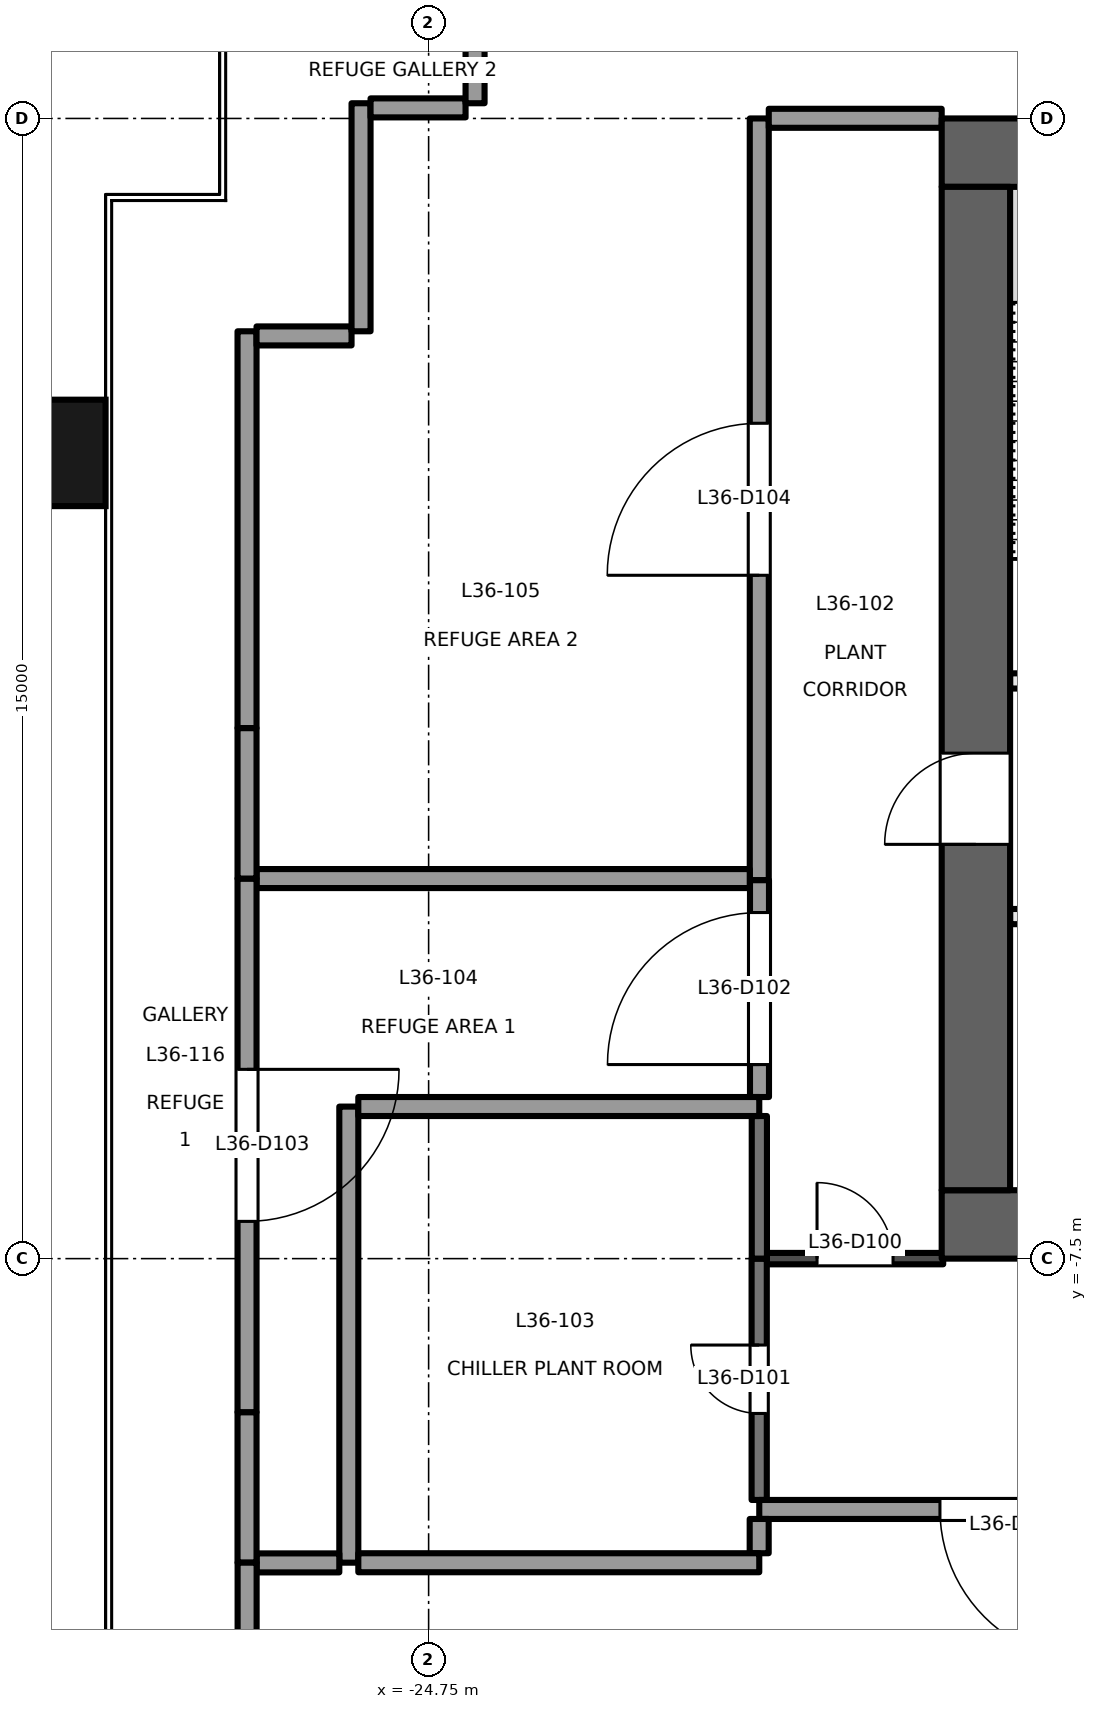
"""IFC4 building model, lengths in metres.
Left out: names, types, materials, properties, quantities, classifications, styles, units other than length and angle.
Written with IfcOpenShell. Run it as: python <this file> out.ifc"""

import sys

from ifc_helpers import new_model, si_unit, direction, frame, frame_2d, origin, origin_2d, place, context, subcontext, project, spatial, rectangle, extrude, element, fill, save


model = new_model("IFC4")
c1 = context("Model", 3, precision=1e-05, world=origin(), true_north=direction((0.0, 1.0)))
c2 = subcontext(c1, "Body", "Model", "MODEL_VIEW")
j1 = project(units=[si_unit("LENGTHUNIT", "METRE"), si_unit("PLANEANGLEUNIT", "RADIAN")], contexts=[c1])
p1 = place(None, origin())
s1 = spatial("IfcSite", under=j1, at=p1, CompositionType="ELEMENT")
p2 = place(p1, origin())
s2 = spatial("IfcBuilding", under=s1, at=p2, CompositionType="ELEMENT")
p3 = place(p2, frame((0.0, 0.0, 158.1)))
s3 = spatial("IfcBuildingStorey", under=s2, at=p3, CompositionType="ELEMENT", Elevation=158.1)
p4 = place(p3, frame((-29.9, 3.1, -0.2), z_axis=(0.0, 0.0, 1.0), x_axis=(0.0, 1.0, 0.0)))
e1 = element("IfcColumn", 1, at=p4, inside=s3, PredefinedType="COLUMN", context=c2, shape_type="SweptSolid", body=[
    extrude(rectangle(XDim=1.4, YDim=1.8, at=origin_2d()), origin(), (0.0, 0.0, 1.0), 5.0),
])
p5 = place(p3, frame((-18.0, -7.05, -0.2), z_axis=(0.0, 0.0, 1.0), x_axis=(1.0, 0.0, 0.0)))
e2 = element("IfcWall", 2, at=p5, inside=s3, PredefinedType="SHEAR", context=c2, shape_type="SweptSolid", body=[
    extrude(rectangle(XDim=36.0, YDim=0.9, at=frame_2d((18.0, 0.0))), origin(), (0.0, 0.0, 1.0), 5.0),
])
p6 = place(p5, frame((7.8, 0.0, 0.2)))
e3 = element("IfcOpeningElement", 3, at=p6, cuts=e2, PredefinedType="OPENING", context=c2, shape_type="SweptSolid", body=[
    extrude(rectangle(XDim=2.4, YDim=2.1, at=frame_2d((1.2, 1.05))), frame((0.0, 0.46, 0.0), z_axis=(0.0, -1.0, 0.0), x_axis=(1.0, 0.0, 0.0)), (0.0, 0.0, 1.0), 0.921),
])
p7 = place(p5, frame((17.4, 0.0, 0.2)))
e4 = element("IfcOpeningElement", 4, at=p7, cuts=e2, PredefinedType="OPENING", context=c2, shape_type="SweptSolid", body=[
    extrude(rectangle(XDim=1.2, YDim=2.1, at=frame_2d((0.6, 1.05))), frame((0.0, 0.46, 0.0), z_axis=(0.0, -1.0, 0.0), x_axis=(1.0, 0.0, 0.0)), (0.0, 0.0, 1.0), 0.921),
])
p8 = place(p5, frame((26.1, 0.0, 0.2)))
e5 = element("IfcOpeningElement", 5, at=p8, cuts=e2, PredefinedType="OPENING", context=c2, shape_type="SweptSolid", body=[
    extrude(rectangle(XDim=2.4, YDim=2.1, at=frame_2d((1.2, 1.05))), frame((0.0, 0.46, 0.0), z_axis=(0.0, -1.0, 0.0), x_axis=(1.0, 0.0, 0.0)), (0.0, 0.0, 1.0), 0.921),
])
p9 = place(p3, frame((-18.0, 7.05, -0.2), z_axis=(0.0, 0.0, 1.0), x_axis=(1.0, 0.0, 0.0)))
e6 = element("IfcWall", 6, at=p9, inside=s3, PredefinedType="SHEAR", context=c2, shape_type="SweptSolid", body=[
    extrude(rectangle(XDim=36.0, YDim=0.9, at=frame_2d((18.0, 0.0))), origin(), (0.0, 0.0, 1.0), 5.0),
])
p10 = place(p3, frame((-17.55, -6.6, -0.2), z_axis=(0.0, 0.0, 1.0), x_axis=(0.0, 1.0, 0.0)))
e7 = element("IfcWall", 7, at=p10, inside=s3, PredefinedType="SHEAR", context=c2, shape_type="SweptSolid", body=[
    extrude(rectangle(XDim=13.2, YDim=0.9, at=frame_2d((6.6, 0.0))), origin(), (0.0, 0.0, 1.0), 5.0),
])
p11 = place(p10, frame((4.55, 0.0, 0.2)))
e8 = element("IfcOpeningElement", 8, at=p11, cuts=e7, PredefinedType="OPENING", context=c2, shape_type="SweptSolid", body=[
    extrude(rectangle(XDim=1.2, YDim=2.1, at=frame_2d((0.6, 1.05))), frame((0.0, 0.46, 0.0), z_axis=(0.0, -1.0, 0.0), x_axis=(1.0, 0.0, 0.0)), (0.0, 0.0, 1.0), 0.921),
])
p12 = place(p3, frame((-17.1, -3.0, 0.0), z_axis=(0.0, 0.0, 1.0), x_axis=(1.0, 0.0, 0.0)))
e9 = element("IfcWall", 9, at=p12, inside=s3, PredefinedType="PARTITIONING", context=c2, shape_type="SweptSolid", body=[
    extrude(rectangle(XDim=3.3, YDim=0.2, at=frame_2d((1.65, 0.0))), origin(), (0.0, 0.0, 1.0), 4.8),
])
p13 = place(p12, frame((1.1, 0.0, 0.0)))
e10 = element("IfcOpeningElement", 10, at=p13, cuts=e9, PredefinedType="OPENING", context=c2, shape_type="SweptSolid", body=[
    extrude(rectangle(XDim=1.1, YDim=2.1, at=frame_2d((0.55, 1.05))), frame((0.0, 0.111, 0.0), z_axis=(0.0, -1.0, 0.0), x_axis=(1.0, 0.0, 0.0)), (0.0, 0.0, 1.0), 0.221),
])
p14 = place(p3, frame((-17.1, 0.1, 0.0), z_axis=(0.0, 0.0, 1.0), x_axis=(1.0, 0.0, 0.0)))
e11 = element("IfcWall", 11, at=p14, inside=s3, PredefinedType="PARTITIONING", context=c2, shape_type="SweptSolid", body=[
    extrude(rectangle(XDim=3.3, YDim=0.2, at=frame_2d((1.65, 0.0))), origin(), (0.0, 0.0, 1.0), 4.8),
])
p15 = place(p14, frame((1.1, 0.0, 0.0)))
e12 = element("IfcOpeningElement", 12, at=p15, cuts=e11, PredefinedType="OPENING", context=c2, shape_type="SweptSolid", body=[
    extrude(rectangle(XDim=1.1, YDim=2.1, at=frame_2d((0.55, 1.05))), frame((0.0, 0.111, 0.0), z_axis=(0.0, -1.0, 0.0), x_axis=(1.0, 0.0, 0.0)), (0.0, 0.0, 1.0), 0.221),
])
p16 = place(p3, frame((-20.3, -7.5, 0.0), z_axis=(0.0, 0.0, 1.0), x_axis=(1.0, 0.0, 0.0)))
e13 = element("IfcWall", 13, at=p16, inside=s3, PredefinedType="PARTITIONING", context=c2, shape_type="SweptSolid", body=[
    extrude(rectangle(XDim=2.32, YDim=0.15, at=frame_2d((1.16, 0.0))), origin(), (0.0, 0.0, 1.0), 4.8),
])
p17 = place(p16, frame((0.66, 0.0, 0.0)))
e14 = element("IfcOpeningElement", 14, at=p17, cuts=e13, PredefinedType="OPENING", context=c2, shape_type="SweptSolid", body=[
    extrude(rectangle(XDim=1.0, YDim=2.1, at=frame_2d((0.5, 1.05))), frame((0.0, 0.085, 0.0), z_axis=(0.0, -1.0, 0.0), x_axis=(1.0, 0.0, 0.0)), (0.0, 0.0, 1.0), 0.171),
])
p18 = place(p3, frame((-20.401, -10.675, 0.0), z_axis=(0.0, 0.0, 1.0), x_axis=(0.0, 1.0, 0.0)))
e15 = element("IfcWall", 15, at=p18, inside=s3, PredefinedType="PARTITIONING", context=c2, shape_type="SweptSolid", body=[
    extrude(rectangle(XDim=3.175, YDim=0.2, at=frame_2d((1.587, 0.0))), origin(), (0.0, 0.0, 1.0), 4.8),
])
p19 = place(p18, frame((1.138, 0.0, 0.0)))
e16 = element("IfcOpeningElement", 16, at=p19, cuts=e15, PredefinedType="OPENING", context=c2, shape_type="SweptSolid", body=[
    extrude(rectangle(XDim=0.9, YDim=2.1, at=frame_2d((0.45, 1.05))), frame((0.0, 0.111, 0.0), z_axis=(0.0, -1.0, 0.0), x_axis=(1.0, 0.0, 0.0)), (0.0, 0.0, 1.0), 0.221),
])
p20 = place(p3, frame((-13.647, -10.8, 0.0), z_axis=(0.0, 0.0, 1.0), x_axis=(-1.0, 0.0, 0.0)))
e17 = element("IfcWall", 17, at=p20, inside=s3, PredefinedType="PARTITIONING", context=c2, shape_type="SweptSolid", body=[
    extrude(rectangle(XDim=6.753, YDim=0.25, at=frame_2d((3.376, 0.0))), origin(), (0.0, 0.0, 1.0), 3.9),
])
p21 = place(p20, frame((2.376, 0.0, 0.0)))
e18 = element("IfcOpeningElement", 18, at=p21, cuts=e17, PredefinedType="OPENING", context=c2, shape_type="SweptSolid", body=[
    extrude(rectangle(XDim=2.0, YDim=2.1, at=frame_2d((1.0, 1.05))), frame((0.0, 0.135, 0.0), z_axis=(0.0, -1.0, 0.0), x_axis=(1.0, 0.0, 0.0)), (0.0, 0.0, 1.0), 0.271),
])
p22 = place(p3, frame((-20.399, -7.5, 0.0), z_axis=(0.0, 0.0, 1.0), x_axis=(0.0, 1.0, 0.0)))
e19 = element("IfcWall", 19, at=p22, inside=s3, PredefinedType="PARTITIONING", context=c2, shape_type="SweptSolid", body=[
    extrude(rectangle(XDim=1.876, YDim=0.2, at=frame_2d((0.938, 0.0))), origin(), (0.0, 0.0, 1.0), 4.8),
])
p23 = place(p3, frame((-20.397, -5.374, 0.0), z_axis=(0.0, 0.0, 1.0), x_axis=(0.0, 1.0, 0.0)))
e20 = element("IfcWall", 20, at=p23, inside=s3, PredefinedType="PARTITIONING", context=c2, shape_type="SweptSolid", body=[
    extrude(rectangle(XDim=2.854, YDim=0.25, at=frame_2d((1.427, 0.0))), origin(), (0.0, 0.0, 1.0), 4.35),
])
p24 = place(p23, frame((0.427, 0.0, 0.0)))
e21 = element("IfcOpeningElement", 21, at=p24, cuts=e20, PredefinedType="OPENING", context=c2, shape_type="SweptSolid", body=[
    extrude(rectangle(XDim=2.0, YDim=2.1, at=frame_2d((1.0, 1.05))), frame((0.0, 0.135, 0.0), z_axis=(0.0, -1.0, 0.0), x_axis=(1.0, 0.0, 0.0)), (0.0, 0.0, 1.0), 0.271),
])
p25 = place(p3, frame((-20.4, -2.52, 0.0), z_axis=(0.0, 0.0, 1.0), x_axis=(0.0, 1.0, 0.0)))
e22 = element("IfcWall", 22, at=p25, inside=s3, PredefinedType="PARTITIONING", context=c2, shape_type="SweptSolid", body=[
    extrude(rectangle(XDim=10.02, YDim=0.25, at=frame_2d((5.01, 0.0))), origin(), (0.0, 0.0, 1.0), 4.3),
])
p26 = place(p25, frame((4.01, 0.0, 0.0)))
e23 = element("IfcOpeningElement", 23, at=p26, cuts=e22, PredefinedType="OPENING", context=c2, shape_type="SweptSolid", body=[
    extrude(rectangle(XDim=2.0, YDim=2.1, at=frame_2d((1.0, 1.05))), frame((0.0, 0.135, 0.0), z_axis=(0.0, -1.0, 0.0), x_axis=(1.0, 0.0, 0.0)), (0.0, 0.0, 1.0), 0.271),
])
p27 = place(p3, frame((-20.275, 7.502, 0.0), z_axis=(0.0, 0.0, 1.0), x_axis=(1.0, 0.0, 0.0)))
e24 = element("IfcWall", 24, at=p27, inside=s3, PredefinedType="PARTITIONING", context=c2, shape_type="SweptSolid", body=[
    extrude(rectangle(XDim=2.275, YDim=0.25, at=frame_2d((1.137, 0.0))), origin(), (0.0, 0.0, 1.0), 4.8),
])
p28 = place(p3, frame((-25.8, -11.5, 0.0), z_axis=(0.0, 0.0, 1.0), x_axis=(0.0, 1.0, 0.0)))
e25 = element("IfcWall", 25, at=p28, inside=s3, PredefinedType="PARTITIONING", context=c2, shape_type="SweptSolid", body=[
    extrude(rectangle(XDim=6.0, YDim=0.25, at=frame_2d((3.0, 0.0))), origin(), (0.0, 0.0, 1.0), 4.8),
])
p29 = place(p3, frame((-25.675, -5.499, 0.0), z_axis=(0.0, 0.0, 1.0), x_axis=(1.0, 0.0, 0.0)))
e26 = element("IfcWall", 26, at=p29, inside=s3, PredefinedType="PARTITIONING", context=c2, shape_type="SweptSolid", body=[
    extrude(rectangle(XDim=5.275, YDim=0.25, at=frame_2d((2.638, 0.0))), origin(), (0.0, 0.0, 1.0), 4.8),
])
p30 = place(p3, frame((-20.401, -10.925, 0.0), z_axis=(0.0, 0.0, 1.0), x_axis=(0.0, -1.0, 0.0)))
e27 = element("IfcWall", 27, at=p30, inside=s3, PredefinedType="PARTITIONING", context=c2, shape_type="SweptSolid", body=[
    extrude(rectangle(XDim=0.451, YDim=0.25, at=frame_2d((0.226, 0.0))), origin(), (0.0, 0.0, 1.0), 4.8),
])
p31 = place(p3, frame((-20.4, -11.501, 0.0), z_axis=(0.0, 0.0, 1.0), x_axis=(-1.0, 0.0, 0.0)))
e28 = element("IfcWall", 28, at=p31, inside=s3, PredefinedType="PARTITIONING", context=c2, shape_type="SweptSolid", body=[
    extrude(rectangle(XDim=5.275, YDim=0.25, at=frame_2d((2.638, 0.0))), origin(), (0.0, 0.0, 1.0), 4.8),
])
p32 = place(p3, frame((-27.014, -2.5, 0.0), z_axis=(0.0, 0.0, 1.0), x_axis=(1.0, 0.0, 0.0)))
e29 = element("IfcWall", 29, at=p32, inside=s3, PredefinedType="PARTITIONING", context=c2, shape_type="SweptSolid", body=[
    extrude(rectangle(XDim=6.489, YDim=0.25, at=frame_2d((3.245, 0.0))), origin(), (0.0, 0.0, 1.0), 4.8),
])
p33 = place(p3, frame((-25.925, -11.503, 0.0), z_axis=(0.0, 0.0, 1.0), x_axis=(-1.0, 0.0, 0.0)))
e30 = element("IfcWall", 30, at=p33, inside=s3, PredefinedType="PARTITIONING", context=c2, shape_type="SweptSolid", body=[
    extrude(rectangle(XDim=1.088, YDim=0.25, at=frame_2d((0.544, 0.0))), origin(), (0.0, 0.0, 1.0), 3.7),
])
p34 = place(p3, frame((-27.139, -11.5, 0.0), z_axis=(0.0, 0.0, 1.0), x_axis=(0.0, 1.0, 0.0)))
e31 = element("IfcWall", 31, at=p34, inside=s3, PredefinedType="PARTITIONING", context=c2, shape_type="SweptSolid", body=[
    extrude(rectangle(XDim=1.98, YDim=0.25, at=frame_2d((0.99, 0.0))), origin(), (0.0, 0.0, 1.0), 4.8),
])
p35 = place(p3, frame((-27.139, -2.5, 0.0), z_axis=(0.0, 0.0, 1.0), x_axis=(0.0, -1.0, 0.0)))
e32 = element("IfcWall", 32, at=p35, inside=s3, PredefinedType="PARTITIONING", context=c2, shape_type="SweptSolid", body=[
    extrude(rectangle(XDim=7.02, YDim=0.25, at=frame_2d((3.51, 0.0))), origin(), (0.0, 0.0, 1.0), 3.7),
])
p36 = place(p35, frame((2.51, 0.0, 0.0)))
e33 = element("IfcOpeningElement", 33, at=p36, cuts=e32, PredefinedType="OPENING", context=c2, shape_type="SweptSolid", body=[
    extrude(rectangle(XDim=2.0, YDim=2.1, at=frame_2d((1.0, 1.05))), frame((0.0, 0.135, 0.0), z_axis=(0.0, -1.0, 0.0), x_axis=(1.0, 0.0, 0.0)), (0.0, 0.0, 1.0), 0.271),
])
p37 = place(p3, frame((-27.139, -2.5, 0.0), z_axis=(0.0, 0.0, 1.0), x_axis=(0.0, 1.0, 0.0)))
e34 = element("IfcWall", 34, at=p37, inside=s3, PredefinedType="PARTITIONING", context=c2, shape_type="SweptSolid", body=[
    extrude(rectangle(XDim=1.98, YDim=0.25, at=frame_2d((0.99, 0.0))), origin(), (0.0, 0.0, 1.0), 4.8),
])
p38 = place(p3, frame((-27.139, -0.52, 0.0), z_axis=(0.0, 0.0, 1.0), x_axis=(0.0, 1.0, 0.0)))
e35 = element("IfcWall", 35, at=p38, inside=s3, PredefinedType="PARTITIONING", context=c2, shape_type="SweptSolid", body=[
    extrude(rectangle(XDim=5.22, YDim=0.25, at=frame_2d((2.61, 0.0))), origin(), (0.0, 0.0, 1.0), 4.3),
])
p39 = place(p3, frame((-27.014, 4.639, 0.0), z_axis=(0.0, 0.0, 1.0), x_axis=(1.0, 0.0, 0.0)))
e36 = element("IfcWall", 36, at=p39, inside=s3, PredefinedType="PARTITIONING", context=c2, shape_type="SweptSolid", body=[
    extrude(rectangle(XDim=1.25, YDim=0.25, at=frame_2d((0.625, 0.0))), origin(), (0.0, 0.0, 1.0), 4.3),
])
p40 = place(p3, frame((-25.639, 4.7, 0.0), z_axis=(0.0, 0.0, 1.0), x_axis=(0.0, 1.0, 0.0)))
e37 = element("IfcWall", 37, at=p40, inside=s3, PredefinedType="PARTITIONING", context=c2, shape_type="SweptSolid", body=[
    extrude(rectangle(XDim=3.0, YDim=0.25, at=frame_2d((1.5, 0.0))), origin(), (0.0, 0.0, 1.0), 4.8),
])
p41 = place(p3, frame((-25.514, 7.639, 0.0), z_axis=(0.0, 0.0, 1.0), x_axis=(1.0, 0.0, 0.0)))
e38 = element("IfcWall", 38, at=p41, inside=s3, PredefinedType="PARTITIONING", context=c2, shape_type="SweptSolid", body=[
    extrude(rectangle(XDim=1.25, YDim=0.25, at=frame_2d((0.625, 0.0))), origin(), (0.0, 0.0, 1.0), 4.8),
])
p42 = place(p3, frame((-24.139, 7.7, 0.0), z_axis=(0.0, 0.0, 1.0), x_axis=(0.0, 1.0, 0.0)))
e39 = element("IfcWall", 39, at=p42, inside=s3, PredefinedType="PARTITIONING", context=c2, shape_type="SweptSolid", body=[
    extrude(rectangle(XDim=2.814, YDim=0.25, at=frame_2d((1.407, 0.0))), origin(), (0.0, 0.0, 1.0), 4.8),
])
p43 = place(p3, frame((-27.138, -21.7, 0.0), z_axis=(0.0, 0.0, 1.0), x_axis=(0.0, 1.0, 0.0)))
e40 = element("IfcWall", 40, at=p43, inside=s3, PredefinedType="PARTITIONING", context=c2, shape_type="SweptSolid", body=[
    extrude(rectangle(XDim=10.2, YDim=0.25, at=frame_2d((5.1, 0.0))), origin(), (0.0, 0.0, 1.0), 2.75),
])
p44 = place(p11, origin())
e41 = element("IfcDoor", 41, at=p44, inside=s3, OperationType="SINGLE_SWING_LEFT", PredefinedType="DOOR", context=c2, shape_type="SweptSolid", body=[
    extrude(rectangle(XDim=1.2, YDim=2.1, at=frame_2d((0.6, 1.05))), frame((0.0, 0.025, 0.0), z_axis=(0.0, -1.0, 0.0), x_axis=(1.0, 0.0, 0.0)), (0.0, 0.0, 1.0), 0.05),
])
fill(e8, e41)
p45 = place(p17, origin())
e42 = element("IfcDoor", 42, at=p45, inside=s3, OperationType="SINGLE_SWING_LEFT", PredefinedType="DOOR", context=c2, shape_type="SweptSolid", body=[
    extrude(rectangle(XDim=1.0, YDim=2.1, at=frame_2d((0.5, 1.05))), frame((0.0, 0.025, 0.0), z_axis=(0.0, -1.0, 0.0), x_axis=(1.0, 0.0, 0.0)), (0.0, 0.0, 1.0), 0.05),
])
fill(e14, e42)
p46 = place(p19, origin())
e43 = element("IfcDoor", 43, at=p46, inside=s3, OperationType="SINGLE_SWING_RIGHT", PredefinedType="DOOR", context=c2, shape_type="SweptSolid", body=[
    extrude(rectangle(XDim=0.9, YDim=2.1, at=frame_2d((0.45, 1.05))), frame((0.0, 0.025, 0.0), z_axis=(0.0, -1.0, 0.0), x_axis=(1.0, 0.0, 0.0)), (0.0, 0.0, 1.0), 0.05),
])
fill(e16, e43)
p47 = place(p24, origin())
e44 = element("IfcDoor", 44, at=p47, inside=s3, OperationType="DOUBLE_DOOR_SINGLE_SWING", PredefinedType="DOOR", context=c2, shape_type="SweptSolid", body=[
    extrude(rectangle(XDim=2.0, YDim=2.1, at=frame_2d((1.0, 1.05))), frame((0.0, 0.025, 0.0), z_axis=(0.0, -1.0, 0.0), x_axis=(1.0, 0.0, 0.0)), (0.0, 0.0, 1.0), 0.05),
])
fill(e21, e44)
p48 = place(p36, origin())
e45 = element("IfcDoor", 45, at=p48, inside=s3, OperationType="DOUBLE_DOOR_SINGLE_SWING", PredefinedType="DOOR", context=c2, shape_type="SweptSolid", body=[
    extrude(rectangle(XDim=2.0, YDim=2.1, at=frame_2d((1.0, 1.05))), frame((0.0, 0.025, 0.0), z_axis=(0.0, -1.0, 0.0), x_axis=(1.0, 0.0, 0.0)), (0.0, 0.0, 1.0), 0.05),
])
fill(e33, e45)
p49 = place(p26, origin())
e46 = element("IfcDoor", 46, at=p49, inside=s3, OperationType="DOUBLE_DOOR_SINGLE_SWING", PredefinedType="DOOR", context=c2, shape_type="SweptSolid", body=[
    extrude(rectangle(XDim=2.0, YDim=2.1, at=frame_2d((1.0, 1.05))), frame((0.0, 0.025, 0.0), z_axis=(0.0, -1.0, 0.0), x_axis=(1.0, 0.0, 0.0)), (0.0, 0.0, 1.0), 0.05),
])
fill(e23, e46)
p50 = place(p21, origin())
e47 = element("IfcDoor", 47, at=p50, inside=s3, OperationType="DOUBLE_DOOR_SINGLE_SWING", PredefinedType="DOOR", context=c2, shape_type="SweptSolid", body=[
    extrude(rectangle(XDim=2.0, YDim=2.1, at=frame_2d((1.0, 1.05))), frame((0.0, 0.025, 0.0), z_axis=(0.0, -1.0, 0.0), x_axis=(1.0, 0.0, 0.0)), (0.0, 0.0, 1.0), 0.05),
])
fill(e18, e47)
save(model, sys.argv[1])
